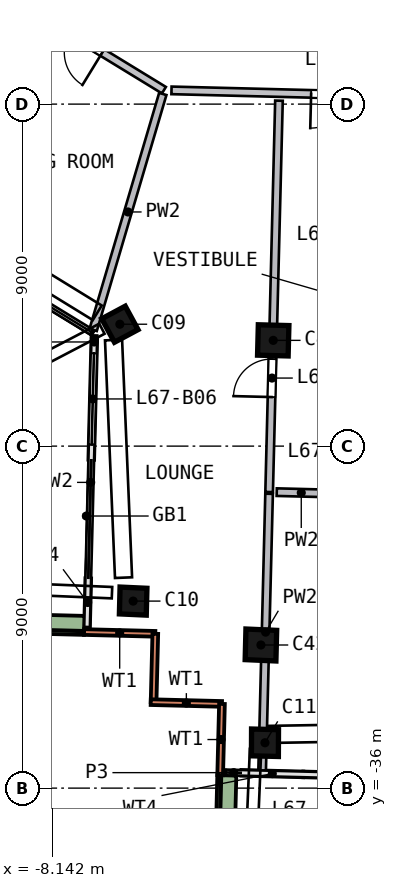
"""IFC4 building model, lengths in metres.
Left out: names, types, materials, properties, quantities, classifications, styles, units other than length and angle.
Written with IfcOpenShell. Run it as: python <this file> out.ifc"""

import sys

from ifc_helpers import new_model, si_unit, direction, frame, frame_2d, origin, origin_2d, place, context, subcontext, project, spatial, rectangle, extrude, element, fill, save


model = new_model("IFC4")
c1 = context("Model", 3, precision=1e-05, world=origin(), true_north=direction((0.0, 1.0)))
c2 = subcontext(c1, "Body", "Model", "MODEL_VIEW")
j1 = project(units=[si_unit("LENGTHUNIT", "METRE"), si_unit("PLANEANGLEUNIT", "RADIAN")], contexts=[c1])
p1 = place(None, origin())
s1 = spatial("IfcSite", under=j1, at=p1, CompositionType="ELEMENT")
p2 = place(p1, origin())
s2 = spatial("IfcBuilding", under=s1, at=p2, CompositionType="ELEMENT")
p3 = place(p2, frame((0.0, 0.0, 274.0)))
s3 = spatial("IfcBuildingStorey", under=s2, at=p3, CompositionType="ELEMENT", Elevation=274.0)
p4 = place(p3, frame((-6.499, -23.756, 0.0), z_axis=(0.113176251, -0.029947242, 0.993123506), x_axis=(-0.470487, 0.878762487, 0.080115381)))
e1 = element("IfcColumn", 1, at=p4, inside=s3, PredefinedType="COLUMN", context=c2, shape_type="SweptSolid", body=[
    extrude(rectangle(XDim=0.7, YDim=0.7, at=origin_2d()), origin(), (0.0, 0.0, 1.0), 3.212),
])
p5 = place(p3, frame((-6.189, -30.905, 0.0), z_axis=(0.144221408, -0.141223042, 0.979416274), x_axis=(-0.045190065, -0.989671145, -0.136047356)))
e2 = element("IfcColumn", 2, at=p5, inside=s3, PredefinedType="COLUMN", context=c2, shape_type="SweptSolid", body=[
    extrude(rectangle(XDim=0.7, YDim=0.7, at=origin_2d()), origin(), (0.0, 0.0, 1.0), 3.257),
])
p6 = place(p3, frame((-2.742, -34.653, 0.0), z_axis=(0.161533593, -0.124821413, 0.978941527), x_axis=(0.986557112, -0.00444103, -0.163356489)))
e3 = element("IfcColumn", 3, at=p6, inside=s3, PredefinedType="COLUMN", context=c2, shape_type="SweptSolid", body=[
    extrude(rectangle(XDim=0.7, YDim=0.7, at=origin_2d()), origin(), (0.0, 0.0, 1.0), 3.259),
])
p7 = place(p3, frame((-2.466, -24.204, 0.0), z_axis=(0.115246525, -0.010718839, 0.993279087), x_axis=(-0.025644135, -0.99964061, -0.007812094)))
e4 = element("IfcColumn", 4, at=p7, inside=s3, PredefinedType="COLUMN", context=c2, shape_type="SweptSolid", body=[
    extrude(rectangle(XDim=0.8, YDim=0.8, at=origin_2d()), origin(), (0.0, 0.0, 1.0), 3.211),
])
p8 = place(p3, frame((-2.833, -32.08, 0.0), z_axis=(0.149814285, -0.125645848, 0.980698119), x_axis=(-0.043558663, -0.991768158, -0.12040998)))
e5 = element("IfcColumn", 5, at=p8, inside=s3, PredefinedType="COLUMN", context=c2, shape_type="SweptSolid", body=[
    extrude(rectangle(XDim=0.8, YDim=0.8, at=origin_2d()), origin(), (0.0, 0.0, 1.0), 3.253),
])
p9 = place(p3, frame((-7.304, -31.893, 0.0), z_axis=(0.0, 0.0, 1.0), x_axis=(0.999684139, -0.025132088, 0.0)))
e6 = element("IfcWall", 6, at=p9, inside=s3, PredefinedType="SOLIDWALL", context=c2, shape_type="SweptSolid", body=[
    extrude(rectangle(XDim=1.875, YDim=0.15, at=frame_2d((0.938, 0.0))), origin(), (0.0, 0.0, 1.0), 3.19),
])
p10 = place(p3, frame((-5.429, -31.94, 0.0), z_axis=(0.0, 0.0, 1.0), x_axis=(-0.025093859, -0.9996851, 0.0)))
e7 = element("IfcWall", 7, at=p10, inside=s3, PredefinedType="SOLIDWALL", context=c2, shape_type="SweptSolid", body=[
    extrude(rectangle(XDim=1.8, YDim=0.15, at=frame_2d((0.9, 0.0))), origin(), (0.0, 0.0, 1.0), 3.19),
])
for number, where, z_axis, x_axis in (
    (8, (-5.55, -33.737, 0.0), (0.0, 0.0, 1.0), (1.0, -0.025, 0.0)),
    (9, (-3.675, -33.784, 0.0), (0.0, 0.0, 1.0), (-0.025, -1.0, 0.0)),
):
    element("IfcWall", number, at=place(p3, frame(where, z_axis=z_axis, x_axis=x_axis)), inside=s3, PredefinedType="SOLIDWALL", context=c2, shape_type="SweptSolid", body=[
        extrude(rectangle(XDim=1.875, YDim=0.15, at=frame_2d((0.938, 0.0))), origin(), (0.0, 0.0, 1.0), 3.19),
    ])
p11 = place(p3, frame((-7.034, -24.159, 0.0), z_axis=(0.0, 0.0, 1.0), x_axis=(-0.025100843, -0.999684924, 0.0)))
e10 = element("IfcWall", 10, at=p11, inside=s3, PredefinedType="SOLIDWALL", context=c2, shape_type="SweptSolid", body=[
    extrude(rectangle(XDim=3.2, YDim=0.15, at=frame_2d((1.6, 0.0))), origin(), (0.0, 0.0, 1.0), 2.525),
])
p12 = place(p11, frame((0.4, 0.0, 0.0)))
e11 = element("IfcOpeningElement", 11, at=p12, cuts=e10, PredefinedType="OPENING", context=c2, shape_type="SweptSolid", body=[
    extrude(rectangle(XDim=2.4, YDim=2.4, at=frame_2d((1.2, 1.2))), frame((0.0, 0.085, 0.0), z_axis=(0.0, -1.0, 0.0), x_axis=(1.0, 0.0, 0.0)), (0.0, 0.0, 1.0), 0.17),
])
p13 = place(p3, frame((-7.193, -30.48, 0.0), z_axis=(0.0, 0.0, 1.0), x_axis=(-0.025179478, -0.999682947, 0.0)))
e12 = element("IfcWall", 12, at=p13, inside=s3, PredefinedType="SOLIDWALL", context=c2, shape_type="SweptSolid", body=[
    extrude(rectangle(XDim=1.27, YDim=0.15, at=frame_2d((0.635, 0.0))), origin(), (0.0, 0.0, 1.0), 2.525),
])
p14 = place(p3, frame((-1.536, -35.639, 0.0), z_axis=(0.0, 0.0, 1.0), x_axis=(0.999685524, -0.025076957, 0.0)))
e13 = element("IfcWall", 13, at=p14, inside=s3, PredefinedType="SOLIDWALL", context=c2, shape_type="SweptSolid", body=[
    extrude(rectangle(XDim=3.31, YDim=0.15, at=frame_2d((1.655, 0.0))), origin(), (0.0, 0.0, 1.0), 2.525),
])
p15 = place(p14, frame((0.4, 0.0, 0.0)))
e14 = element("IfcOpeningElement", 14, at=p15, cuts=e13, PredefinedType="OPENING", context=c2, shape_type="SweptSolid", body=[
    extrude(rectangle(XDim=1.5, YDim=2.4, at=frame_2d((0.75, 1.2))), frame((0.0, 0.085, 0.0), z_axis=(0.0, -1.0, 0.0), x_axis=(1.0, 0.0, 0.0)), (0.0, 0.0, 1.0), 0.17),
])
p16 = place(p3, frame((-3.166, -35.598, 0.0), z_axis=(0.0, 0.0, 1.0), x_axis=(0.999683328, -0.025164339, 0.0)))
e15 = element("IfcWall", 15, at=p16, inside=s3, PredefinedType="SOLIDWALL", context=c2, shape_type="SweptSolid", body=[
    extrude(rectangle(XDim=1.63, YDim=0.15, at=frame_2d((0.815, 0.0))), origin(), (0.0, 0.0, 1.0), 2.525),
])
p17 = place(p3, frame((-9.999, -31.65, 0.0), z_axis=(0.0, 0.0, 1.0), x_axis=(0.999683793, -0.025145864, 0.0)))
e16 = element("IfcWall", 16, at=p17, inside=s3, PredefinedType="SOLIDWALL", context=c2, shape_type="SweptSolid", body=[
    extrude(rectangle(XDim=2.699, YDim=0.5, at=frame_2d((1.35, 0.0))), origin(), (0.0, 0.0, 1.0), 0.7),
])
p18 = place(p3, frame((-3.547, -35.664, 0.0), z_axis=(0.0, 0.0, 1.0), x_axis=(-0.025108503, -0.999684732, 0.0)))
e17 = element("IfcWall", 17, at=p18, inside=s3, PredefinedType="SOLIDWALL", context=c2, shape_type="SweptSolid", body=[
    extrude(rectangle(XDim=3.199, YDim=0.5, at=frame_2d((1.6, 0.0))), origin(), (0.0, 0.0, 1.0), 0.7),
])
p19 = place(p3, frame((-5.203, -17.633, 0.0), z_axis=(0.0, 0.0, 1.0), x_axis=(-0.853187331, 0.521604619, 0.0)))
e18 = element("IfcWall", 18, at=p19, inside=s3, PredefinedType="SOLIDWALL", context=c2, shape_type="SweptSolid", body=[
    extrude(rectangle(XDim=9.517, YDim=0.2, at=frame_2d((4.758, 0.0))), origin(), (0.0, 0.0, 1.0), 3.19),
])
p20 = place(p19, frame((1.9, 0.0, 0.0)))
e19 = element("IfcOpeningElement", 19, at=p20, cuts=e18, PredefinedType="OPENING", context=c2, shape_type="SweptSolid", body=[
    extrude(rectangle(XDim=1.0, YDim=2.1, at=frame_2d((0.5, 1.05))), frame((0.0, 0.11, 0.0), z_axis=(0.0, -1.0, 0.0), x_axis=(1.0, 0.0, 0.0)), (0.0, 0.0, 1.0), 0.22),
])
p21 = place(p3, frame((4.311, -17.872, 0.0), z_axis=(0.0, 0.0, 1.0), x_axis=(-0.999684183, 0.025130335, 0.0)))
e20 = element("IfcWall", 20, at=p21, inside=s3, PredefinedType="SOLIDWALL", context=c2, shape_type="SweptSolid", body=[
    extrude(rectangle(XDim=9.317, YDim=0.2, at=frame_2d((4.658, 0.0))), origin(), (0.0, 0.0, 1.0), 3.19),
])
p22 = place(p21, frame((3.842, 0.0, 0.0)))
e21 = element("IfcOpeningElement", 21, at=p22, cuts=e20, PredefinedType="OPENING", context=c2, shape_type="SweptSolid", body=[
    extrude(rectangle(XDim=1.8, YDim=2.1, at=frame_2d((0.9, 1.05))), frame((0.0, 0.11, 0.0), z_axis=(0.0, -1.0, 0.0), x_axis=(1.0, 0.0, 0.0)), (0.0, 0.0, 1.0), 0.22),
])
p23 = place(p3, frame((-7.065, -23.944, 0.0), z_axis=(0.0, 0.0, 1.0), x_axis=(0.283011215, 0.9591166, 0.0)))
e22 = element("IfcWall", 22, at=p23, inside=s3, PredefinedType="SOLIDWALL", context=c2, shape_type="SweptSolid", body=[
    extrude(rectangle(XDim=6.476, YDim=0.2, at=frame_2d((3.238, 0.0))), origin(), (0.0, 0.0, 1.0), 3.19),
])
p24 = place(p3, frame((-2.435, -28.254, 0.0), z_axis=(0.0, 0.0, 1.0), x_axis=(-0.025136215, -0.999684035, 0.0)))
e23 = element("IfcWall", 23, at=p24, inside=s3, PredefinedType="SOLIDWALL", context=c2, shape_type="SweptSolid", body=[
    extrude(rectangle(XDim=7.284, YDim=0.2, at=frame_2d((3.642, 0.0))), origin(), (0.0, 0.0, 1.0), 3.19),
])
p25 = place(p3, frame((-2.434, -28.208, 0.0), z_axis=(0.0, 0.0, 1.0), x_axis=(0.025120081, 0.999684441, 0.0)))
e24 = element("IfcWall", 24, at=p25, inside=s3, PredefinedType="SOLIDWALL", context=c2, shape_type="SweptSolid", body=[
    extrude(rectangle(XDim=10.302, YDim=0.2, at=frame_2d((5.151, 0.0))), origin(), (0.0, 0.0, 1.0), 3.19),
])
p26 = place(p25, frame((2.5, 0.0, 0.0)))
e25 = element("IfcOpeningElement", 25, at=p26, cuts=e24, PredefinedType="OPENING", context=c2, shape_type="SweptSolid", body=[
    extrude(rectangle(XDim=1.0, YDim=2.1, at=frame_2d((0.5, 1.05))), frame((0.0, 0.11, 0.0), z_axis=(0.0, -1.0, 0.0), x_axis=(1.0, 0.0, 0.0)), (0.0, 0.0, 1.0), 0.22),
])
p27 = place(p3, frame((0.706, -28.285, 0.0), z_axis=(0.0, 0.0, 1.0), x_axis=(-0.999685777, 0.025066847, 0.0)))
e26 = element("IfcWall", 26, at=p27, inside=s3, PredefinedType="SOLIDWALL", context=c2, shape_type="SweptSolid", body=[
    extrude(rectangle(XDim=2.941, YDim=0.2, at=frame_2d((1.471, 0.0))), origin(), (0.0, 0.0, 1.0), 3.19),
])
p28 = place(p27, frame((0.45, 0.0, 0.0)))
e27 = element("IfcOpeningElement", 27, at=p28, cuts=e26, PredefinedType="OPENING", context=c2, shape_type="SweptSolid", body=[
    extrude(rectangle(XDim=1.0, YDim=2.1, at=frame_2d((0.5, 1.05))), frame((0.0, 0.11, 0.0), z_axis=(0.0, -1.0, 0.0), x_axis=(1.0, 0.0, 0.0)), (0.0, 0.0, 1.0), 0.22),
])
p29 = place(p12, origin())
e28 = element("IfcDoor", 28, at=p29, inside=s3, OperationType="SLIDING_TO_LEFT", PredefinedType="DOOR", context=c2, shape_type="SweptSolid", body=[
    extrude(rectangle(XDim=2.4, YDim=2.4, at=frame_2d((1.2, 1.2))), frame((0.0, 0.025, 0.0), z_axis=(0.0, -1.0, 0.0), x_axis=(1.0, 0.0, 0.0)), (0.0, 0.0, 1.0), 0.05),
])
fill(e11, e28)
p30 = place(p20, origin())
e29 = element("IfcDoor", 29, at=p30, inside=s3, OperationType="SINGLE_SWING_LEFT", PredefinedType="DOOR", context=c2, shape_type="SweptSolid", body=[
    extrude(rectangle(XDim=1.0, YDim=2.1, at=frame_2d((0.5, 1.05))), frame((0.0, 0.025, 0.0), z_axis=(0.0, -1.0, 0.0), x_axis=(1.0, 0.0, 0.0)), (0.0, 0.0, 1.0), 0.05),
])
fill(e19, e29)
p31 = place(p22, origin())
e30 = element("IfcDoor", 30, at=p31, inside=s3, OperationType="DOUBLE_DOOR_SINGLE_SWING", PredefinedType="DOOR", context=c2, shape_type="SweptSolid", body=[
    extrude(rectangle(XDim=1.8, YDim=2.1, at=frame_2d((0.9, 1.05))), frame((0.0, 0.025, 0.0), z_axis=(0.0, -1.0, 0.0), x_axis=(1.0, 0.0, 0.0)), (0.0, 0.0, 1.0), 0.05),
])
fill(e21, e30)
p32 = place(p26, origin())
e31 = element("IfcDoor", 31, at=p32, inside=s3, OperationType="SINGLE_SWING_LEFT", PredefinedType="DOOR", context=c2, shape_type="SweptSolid", body=[
    extrude(rectangle(XDim=1.0, YDim=2.1, at=frame_2d((0.5, 1.05))), frame((0.0, 0.025, 0.0), z_axis=(0.0, -1.0, 0.0), x_axis=(1.0, 0.0, 0.0)), (0.0, 0.0, 1.0), 0.05),
])
fill(e25, e31)
save(model, sys.argv[1])
